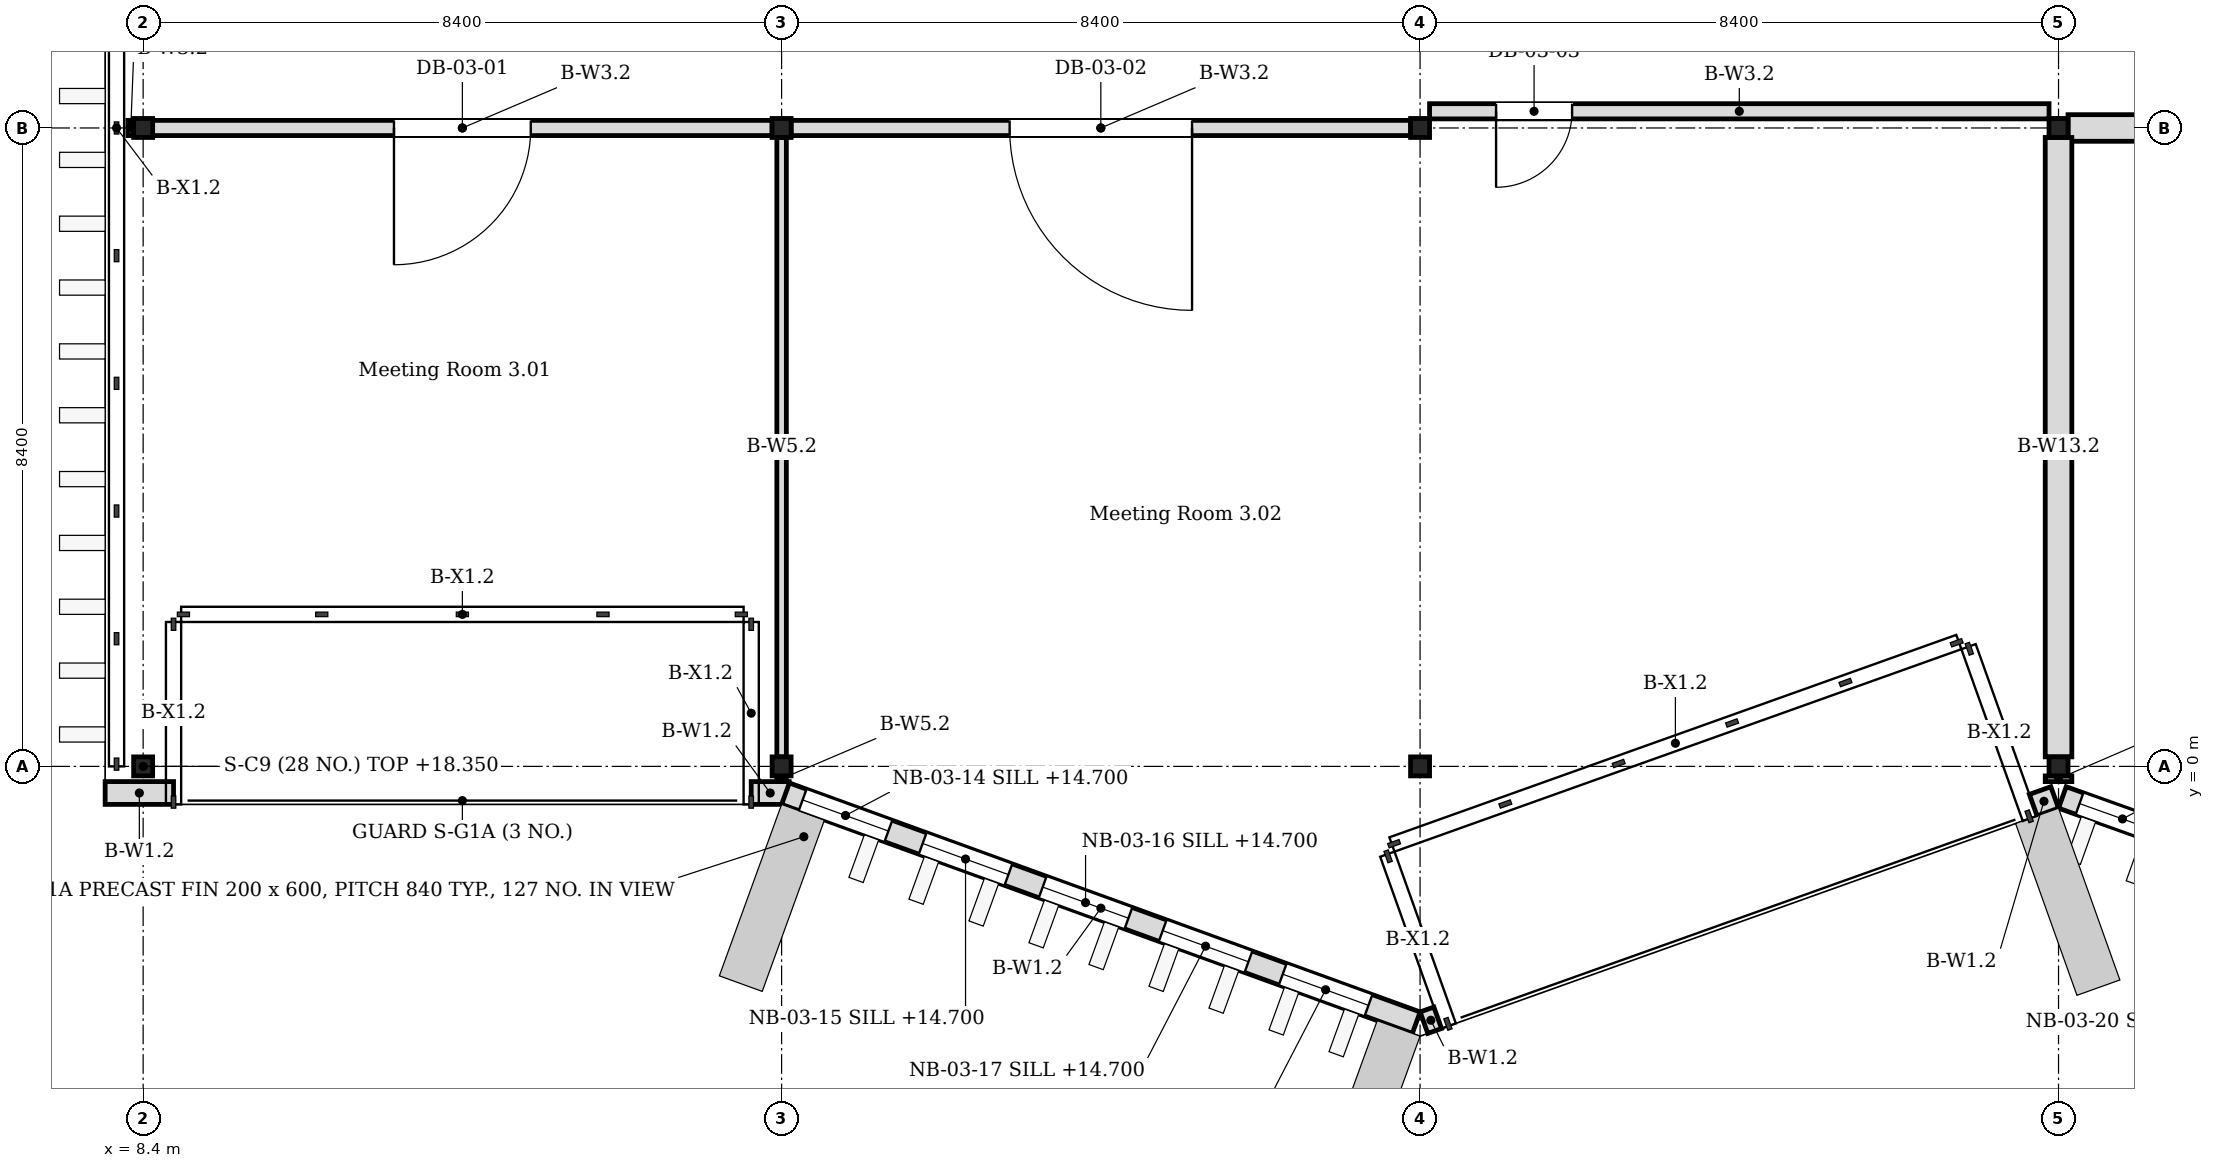
"""IFC4 building model, lengths in metres.
Left out: names, types, materials, properties, quantities, classifications, styles, units other than length and angle.
Written with IfcOpenShell. Run it as: python <this file> out.ifc"""

import sys

from ifc_helpers import new_model, si_unit, direction, frame, frame_2d, origin, origin_2d, place, context, subcontext, project, spatial, rectangle, i_section, extrude, element, fill, save


model = new_model("IFC4")
c1 = context("Model", 3, precision=1e-05, world=origin(), true_north=direction((0.0, 1.0)))
c2 = subcontext(c1, "Body", "Model", "MODEL_VIEW")
j1 = project(units=[si_unit("LENGTHUNIT", "METRE"), si_unit("PLANEANGLEUNIT", "RADIAN")], contexts=[c1])
p1 = place(None, origin())
s1 = spatial("IfcSite", under=j1, at=p1, CompositionType="ELEMENT")
p2 = place(p1, origin())
s2 = spatial("IfcBuilding", under=s1, at=p2, CompositionType="ELEMENT")
p3 = place(p2, frame((0.0, 0.0, 14.4)))
s3 = spatial("IfcBuildingStorey", under=s2, at=p3, CompositionType="ELEMENT", Elevation=14.4)
for number, where, z_axis, x_axis in (
    (1, (8.4, 0.0, 0.0), (0.0, 0.0, 1.0), (1.0, 0.0, 0.0)),
    (2, (8.4, 8.4, 0.0), (0.0, 0.0, 1.0), (1.0, 0.0, 0.0)),
    (3, (16.8, 0.0, 0.0), (0.0, 0.0, 1.0), (1.0, 0.0, 0.0)),
    (4, (16.8, 8.4, 0.0), (0.0, 0.0, 1.0), (1.0, 0.0, 0.0)),
    (5, (25.2, 0.0, 0.0), (0.0, 0.0, 1.0), (1.0, 0.0, 0.0)),
    (6, (25.2, 8.4, 0.0), (0.0, 0.0, 1.0), (1.0, 0.0, 0.0)),
    (7, (33.6, 0.0, 0.0), (0.0, 0.0, 1.0), (1.0, 0.0, 0.0)),
    (8, (33.6, 8.4, 0.0), (0.0, 0.0, 1.0), (1.0, 0.0, 0.0)),
):
    element("IfcColumn", number, at=place(p3, frame(where, z_axis=z_axis, x_axis=x_axis)), inside=s3, PredefinedType="COLUMN", context=c2, shape_type="SweptSolid", body=[
        extrude(i_section(OverallWidth=0.25, OverallDepth=0.25, WebThickness=0.009, FlangeThickness=0.014, FilletRadius=0.013, at=origin_2d()), origin(), (0.0, 0.0, 1.0), 3.95),
    ])
p4 = place(p3, frame((7.9, -0.35, 0.0), z_axis=(0.0, 0.0, 1.0), x_axis=(1.0, 0.0, 0.0)))
e9 = element("IfcWall", 9, at=p4, inside=s3, PredefinedType="SOLIDWALL", context=c2, shape_type="SweptSolid", body=[
    extrude(rectangle(XDim=0.9, YDim=0.3, at=frame_2d((0.45, 0.0))), origin(), (0.0, 0.0, 1.0), 3.95),
])
p5 = place(p3, frame((16.4, -0.35, 0.0), z_axis=(0.0, 0.0, 1.0), x_axis=(1.0, 0.0, 0.0)))
e10 = element("IfcWall", 10, at=p5, inside=s3, PredefinedType="SOLIDWALL", context=c2, shape_type="SweptSolid", body=[
    extrude(rectangle(XDim=0.5, YDim=0.3, at=frame_2d((0.25, 0.0))), origin(), (0.0, 0.0, 1.0), 3.95),
])
p6 = place(p3, frame((16.851, -0.359, 0.0), z_axis=(0.0, 0.0, 1.0), x_axis=(0.939953187971, -0.341303390584, 0.0)))
e11 = element("IfcWall", 11, at=p6, inside=s3, PredefinedType="SOLIDWALL", context=c2, shape_type="SweptSolid", body=[
    extrude(rectangle(XDim=8.828, YDim=0.3, at=frame_2d((4.414, 0.0))), origin(), (0.0, 0.0, 1.0), 3.95),
])
p7 = place(p6, frame((0.24, 0.0, 0.3)))
e12 = element("IfcOpeningElement", 12, at=p7, cuts=e11, PredefinedType="OPENING", context=c2, shape_type="SweptSolid", body=[
    extrude(rectangle(XDim=1.2, YDim=3.3, at=frame_2d((0.6, 1.65))), frame((0.0, 0.16, 0.0), z_axis=(0.0, -1.0, 0.0), x_axis=(1.0, 0.0, 0.0)), (0.0, 0.0, 1.0), 0.32),
])
p8 = place(p6, frame((1.92, 0.0, 0.3)))
e13 = element("IfcOpeningElement", 13, at=p8, cuts=e11, PredefinedType="OPENING", context=c2, shape_type="SweptSolid", body=[
    extrude(rectangle(XDim=1.2, YDim=3.3, at=frame_2d((0.6, 1.65))), frame((0.0, 0.16, 0.0), z_axis=(0.0, -1.0, 0.0), x_axis=(1.0, 0.0, 0.0)), (0.0, 0.0, 1.0), 0.32),
])
p9 = place(p6, frame((3.6, 0.0, 0.3)))
e14 = element("IfcOpeningElement", 14, at=p9, cuts=e11, PredefinedType="OPENING", context=c2, shape_type="SweptSolid", body=[
    extrude(rectangle(XDim=1.2, YDim=3.3, at=frame_2d((0.6, 1.65))), frame((0.0, 0.16, 0.0), z_axis=(0.0, -1.0, 0.0), x_axis=(1.0, 0.0, 0.0)), (0.0, 0.0, 1.0), 0.32),
])
p10 = place(p6, frame((5.28, 0.0, 0.3)))
e15 = element("IfcOpeningElement", 15, at=p10, cuts=e11, PredefinedType="OPENING", context=c2, shape_type="SweptSolid", body=[
    extrude(rectangle(XDim=1.2, YDim=3.3, at=frame_2d((0.6, 1.65))), frame((0.0, 0.16, 0.0), z_axis=(0.0, -1.0, 0.0), x_axis=(1.0, 0.0, 0.0)), (0.0, 0.0, 1.0), 0.32),
])
p11 = place(p6, frame((6.96, 0.0, 0.3)))
e16 = element("IfcOpeningElement", 16, at=p11, cuts=e11, PredefinedType="OPENING", context=c2, shape_type="SweptSolid", body=[
    extrude(rectangle(XDim=1.2, YDim=3.3, at=frame_2d((0.6, 1.65))), frame((0.0, 0.16, 0.0), z_axis=(0.0, -1.0, 0.0), x_axis=(1.0, 0.0, 0.0)), (0.0, 0.0, 1.0), 0.32),
])
p12 = place(p3, frame((25.251, -3.372, 0.0), z_axis=(0.0, 0.0, 1.0), x_axis=(0.942000485661, 0.335611509061, 0.0)))
e17 = element("IfcWall", 17, at=p12, inside=s3, PredefinedType="SOLIDWALL", context=c2, shape_type="SweptSolid", body=[
    extrude(rectangle(XDim=0.192, YDim=0.3, at=frame_2d((0.096, 0.0))), origin(), (0.0, 0.0, 1.0), 3.95),
])
p13 = place(p3, frame((33.267, -0.51, 0.0), z_axis=(0.0, 0.0, 1.0), x_axis=(0.941797147708, 0.336181695768, 0.0)))
e18 = element("IfcWall", 18, at=p13, inside=s3, PredefinedType="SOLIDWALL", context=c2, shape_type="SweptSolid", body=[
    extrude(rectangle(XDim=0.3, YDim=0.3, at=frame_2d((0.15, 0.0))), origin(), (0.0, 0.0, 1.0), 3.95),
])
p14 = place(p3, frame((33.65, -0.409, 0.0), z_axis=(0.0, 0.0, 1.0), x_axis=(0.941736270411, -0.336352191894, 0.0)))
e19 = element("IfcWall", 19, at=p14, inside=s3, PredefinedType="SOLIDWALL", context=c2, shape_type="SweptSolid", body=[
    extrude(rectangle(XDim=8.812, YDim=0.3, at=frame_2d((4.406, 0.0))), origin(), (0.0, 0.0, 1.0), 3.95),
])
p15 = place(p14, frame((0.24, 0.0, 0.3)))
e20 = element("IfcOpeningElement", 20, at=p15, cuts=e19, PredefinedType="OPENING", context=c2, shape_type="SweptSolid", body=[
    extrude(rectangle(XDim=1.2, YDim=3.3, at=frame_2d((0.6, 1.65))), frame((0.0, 0.16, 0.0), z_axis=(0.0, -1.0, 0.0), x_axis=(1.0, 0.0, 0.0)), (0.0, 0.0, 1.0), 0.32),
])
p16 = place(p14, frame((1.92, 0.0, 0.3)))
e21 = element("IfcOpeningElement", 21, at=p16, cuts=e19, PredefinedType="OPENING", context=c2, shape_type="SweptSolid", body=[
    extrude(rectangle(XDim=1.2, YDim=3.3, at=frame_2d((0.6, 1.65))), frame((0.0, 0.16, 0.0), z_axis=(0.0, -1.0, 0.0), x_axis=(1.0, 0.0, 0.0)), (0.0, 0.0, 1.0), 0.32),
])
p17 = place(p14, frame((3.6, 0.0, 0.3)))
e22 = element("IfcOpeningElement", 22, at=p17, cuts=e19, PredefinedType="OPENING", context=c2, shape_type="SweptSolid", body=[
    extrude(rectangle(XDim=1.2, YDim=3.3, at=frame_2d((0.6, 1.65))), frame((0.0, 0.16, 0.0), z_axis=(0.0, -1.0, 0.0), x_axis=(1.0, 0.0, 0.0)), (0.0, 0.0, 1.0), 0.32),
])
p18 = place(p14, frame((5.28, 0.0, 0.3)))
e23 = element("IfcOpeningElement", 23, at=p18, cuts=e19, PredefinedType="OPENING", context=c2, shape_type="SweptSolid", body=[
    extrude(rectangle(XDim=1.2, YDim=3.3, at=frame_2d((0.6, 1.65))), frame((0.0, 0.16, 0.0), z_axis=(0.0, -1.0, 0.0), x_axis=(1.0, 0.0, 0.0)), (0.0, 0.0, 1.0), 0.32),
])
p19 = place(p14, frame((6.96, 0.0, 0.3)))
e24 = element("IfcOpeningElement", 24, at=p19, cuts=e19, PredefinedType="OPENING", context=c2, shape_type="SweptSolid", body=[
    extrude(rectangle(XDim=1.2, YDim=3.3, at=frame_2d((0.6, 1.65))), frame((0.0, 0.16, 0.0), z_axis=(0.0, -1.0, 0.0), x_axis=(1.0, 0.0, 0.0)), (0.0, 0.0, 1.0), 0.32),
])
p20 = place(p3, frame((8.2, 8.4, 0.0), z_axis=(0.0, 0.0, 1.0), x_axis=(1.0, 0.0, 0.0)))
e25 = element("IfcWall", 25, at=p20, inside=s3, PredefinedType="PARTITIONING", context=c2, shape_type="SweptSolid", body=[
    extrude(rectangle(XDim=0.075, YDim=0.2, at=frame_2d((0.038, 0.0))), origin(), (0.0, 0.0, 1.0), 3.25),
])
p21 = place(p3, frame((8.525, 8.4, 0.0), z_axis=(0.0, 0.0, 1.0), x_axis=(1.0, 0.0, 0.0)))
e26 = element("IfcWall", 26, at=p21, inside=s3, PredefinedType="PARTITIONING", context=c2, shape_type="SweptSolid", body=[
    extrude(rectangle(XDim=8.15, YDim=0.2, at=frame_2d((4.075, 0.0))), origin(), (0.0, 0.0, 1.0), 3.25),
])
p22 = place(p21, frame((3.175, 0.0, 0.0)))
e27 = element("IfcOpeningElement", 27, at=p22, cuts=e26, PredefinedType="OPENING", context=c2, shape_type="SweptSolid", body=[
    extrude(rectangle(XDim=1.8, YDim=2.1, at=frame_2d((0.9, 1.05))), frame((0.0, 0.11, 0.0), z_axis=(0.0, -1.0, 0.0), x_axis=(1.0, 0.0, 0.0)), (0.0, 0.0, 1.0), 0.22),
])
p23 = place(p3, frame((16.925, 8.4, 0.0), z_axis=(0.0, 0.0, 1.0), x_axis=(1.0, 0.0, 0.0)))
e28 = element("IfcWall", 28, at=p23, inside=s3, PredefinedType="PARTITIONING", context=c2, shape_type="SweptSolid", body=[
    extrude(rectangle(XDim=8.15, YDim=0.2, at=frame_2d((4.075, 0.0))), origin(), (0.0, 0.0, 1.0), 3.25),
])
p24 = place(p23, frame((2.875, 0.0, 0.0)))
e29 = element("IfcOpeningElement", 29, at=p24, cuts=e28, PredefinedType="OPENING", context=c2, shape_type="SweptSolid", body=[
    extrude(rectangle(XDim=2.4, YDim=2.2, at=frame_2d((1.2, 1.1))), frame((0.0, 0.11, 0.0), z_axis=(0.0, -1.0, 0.0), x_axis=(1.0, 0.0, 0.0)), (0.0, 0.0, 1.0), 0.22),
])
p25 = place(p3, frame((25.325, 8.619, 0.0), z_axis=(0.0, 0.0, 1.0), x_axis=(1.0, 0.0, 0.0)))
e30 = element("IfcWall", 30, at=p25, inside=s3, PredefinedType="PARTITIONING", context=c2, shape_type="SweptSolid", body=[
    extrude(rectangle(XDim=8.15, YDim=0.2, at=frame_2d((4.075, 0.0))), origin(), (0.0, 0.0, 1.0), 3.25),
])
p26 = place(p25, frame((0.875, 0.0, 0.0)))
e31 = element("IfcOpeningElement", 31, at=p26, cuts=e30, PredefinedType="OPENING", context=c2, shape_type="SweptSolid", body=[
    extrude(rectangle(XDim=1.0, YDim=2.1, at=frame_2d((0.5, 1.05))), frame((0.0, 0.11, 0.0), z_axis=(0.0, -1.0, 0.0), x_axis=(1.0, 0.0, 0.0)), (0.0, 0.0, 1.0), 0.22),
])
p27 = place(p3, frame((33.725, 8.4, 0.0), z_axis=(0.0, 0.0, 1.0), x_axis=(1.0, 0.0, 0.0)))
e32 = element("IfcWall", 32, at=p27, inside=s3, PredefinedType="PARTITIONING", context=c2, shape_type="SweptSolid", body=[
    extrude(rectangle(XDim=8.15, YDim=0.35, at=frame_2d((4.075, 0.0))), origin(), (0.0, 0.0, 1.0), 3.25),
])
p28 = place(p27, frame((3.525, 0.0, 0.0)))
e33 = element("IfcOpeningElement", 33, at=p28, cuts=e32, PredefinedType="OPENING", context=c2, shape_type="SweptSolid", body=[
    extrude(rectangle(XDim=1.1, YDim=2.4, at=frame_2d((0.55, 1.2))), frame((0.0, 0.185, 0.0), z_axis=(0.0, -1.0, 0.0), x_axis=(1.0, 0.0, 0.0)), (0.0, 0.0, 1.0), 0.37),
])
p29 = place(p3, frame((16.8, -0.2, 0.0), z_axis=(0.0, 0.0, 1.0), x_axis=(0.0, 1.0, 0.0)))
e34 = element("IfcWall", 34, at=p29, inside=s3, PredefinedType="MOVABLE", context=c2, shape_type="SweptSolid", body=[
    extrude(rectangle(XDim=0.075, YDim=0.125, at=frame_2d((0.038, 0.0))), origin(), (0.0, 0.0, 1.0), 3.25),
])
p30 = place(p3, frame((16.8, 0.125, 0.0), z_axis=(0.0, 0.0, 1.0), x_axis=(0.0, 1.0, 0.0)))
e35 = element("IfcWall", 35, at=p30, inside=s3, PredefinedType="MOVABLE", context=c2, shape_type="SweptSolid", body=[
    extrude(rectangle(XDim=8.15, YDim=0.125, at=frame_2d((4.075, 0.0))), origin(), (0.0, 0.0, 1.0), 3.25),
])
p31 = place(p3, frame((33.6, -0.2, 0.0), z_axis=(0.0, 0.0, 1.0), x_axis=(0.0, 1.0, 0.0)))
e36 = element("IfcWall", 36, at=p31, inside=s3, PredefinedType="PARTITIONING", context=c2, shape_type="SweptSolid", body=[
    extrude(rectangle(XDim=0.075, YDim=0.35, at=frame_2d((0.038, 0.0))), origin(), (0.0, 0.0, 1.0), 3.25),
])
p32 = place(p3, frame((33.6, 0.125, 0.0), z_axis=(0.0, 0.0, 1.0), x_axis=(0.0, 1.0, 0.0)))
e37 = element("IfcWall", 37, at=p32, inside=s3, PredefinedType="PARTITIONING", context=c2, shape_type="SweptSolid", body=[
    extrude(rectangle(XDim=8.15, YDim=0.35, at=frame_2d((4.075, 0.0))), origin(), (0.0, 0.0, 1.0), 3.25),
])
p33 = place(p7, origin())
e38 = element("IfcWindow", 38, at=p33, inside=s3, PartitioningType="TRIPLE_PANEL_VERTICAL", PredefinedType="WINDOW", context=c2, shape_type="SweptSolid", body=[
    extrude(rectangle(XDim=1.2, YDim=3.3, at=frame_2d((0.6, 1.65))), frame((0.0, 0.03, 0.0), z_axis=(0.0, -1.0, 0.0), x_axis=(1.0, 0.0, 0.0)), (0.0, 0.0, 1.0), 0.06),
])
fill(e12, e38)
p34 = place(p8, origin())
e39 = element("IfcWindow", 39, at=p34, inside=s3, PartitioningType="TRIPLE_PANEL_VERTICAL", PredefinedType="WINDOW", context=c2, shape_type="SweptSolid", body=[
    extrude(rectangle(XDim=1.2, YDim=3.3, at=frame_2d((0.6, 1.65))), frame((0.0, 0.03, 0.0), z_axis=(0.0, -1.0, 0.0), x_axis=(1.0, 0.0, 0.0)), (0.0, 0.0, 1.0), 0.06),
])
fill(e13, e39)
p35 = place(p9, origin())
e40 = element("IfcWindow", 40, at=p35, inside=s3, PartitioningType="TRIPLE_PANEL_VERTICAL", PredefinedType="WINDOW", context=c2, shape_type="SweptSolid", body=[
    extrude(rectangle(XDim=1.2, YDim=3.3, at=frame_2d((0.6, 1.65))), frame((0.0, 0.03, 0.0), z_axis=(0.0, -1.0, 0.0), x_axis=(1.0, 0.0, 0.0)), (0.0, 0.0, 1.0), 0.06),
])
fill(e14, e40)
p36 = place(p10, origin())
e41 = element("IfcWindow", 41, at=p36, inside=s3, PartitioningType="TRIPLE_PANEL_VERTICAL", PredefinedType="WINDOW", context=c2, shape_type="SweptSolid", body=[
    extrude(rectangle(XDim=1.2, YDim=3.3, at=frame_2d((0.6, 1.65))), frame((0.0, 0.03, 0.0), z_axis=(0.0, -1.0, 0.0), x_axis=(1.0, 0.0, 0.0)), (0.0, 0.0, 1.0), 0.06),
])
fill(e15, e41)
p37 = place(p11, origin())
e42 = element("IfcWindow", 42, at=p37, inside=s3, PartitioningType="TRIPLE_PANEL_VERTICAL", PredefinedType="WINDOW", context=c2, shape_type="SweptSolid", body=[
    extrude(rectangle(XDim=1.2, YDim=3.3, at=frame_2d((0.6, 1.65))), frame((0.0, 0.03, 0.0), z_axis=(0.0, -1.0, 0.0), x_axis=(1.0, 0.0, 0.0)), (0.0, 0.0, 1.0), 0.06),
])
fill(e16, e42)
p38 = place(p15, origin())
e43 = element("IfcWindow", 43, at=p38, inside=s3, PartitioningType="TRIPLE_PANEL_VERTICAL", PredefinedType="WINDOW", context=c2, shape_type="SweptSolid", body=[
    extrude(rectangle(XDim=1.2, YDim=3.3, at=frame_2d((0.6, 1.65))), frame((0.0, 0.03, 0.0), z_axis=(0.0, -1.0, 0.0), x_axis=(1.0, 0.0, 0.0)), (0.0, 0.0, 1.0), 0.06),
])
fill(e20, e43)
p39 = place(p22, origin())
e44 = element("IfcDoor", 44, at=p39, inside=s3, OperationType="DOUBLE_DOOR_SINGLE_SWING", PredefinedType="DOOR", context=c2, shape_type="SweptSolid", body=[
    extrude(rectangle(XDim=1.8, YDim=2.1, at=frame_2d((0.9, 1.05))), frame((0.0, 0.025, 0.0), z_axis=(0.0, -1.0, 0.0), x_axis=(1.0, 0.0, 0.0)), (0.0, 0.0, 1.0), 0.05),
])
fill(e27, e44)
p40 = place(p24, origin())
e45 = element("IfcDoor", 45, at=p40, inside=s3, OperationType="DOUBLE_DOOR_SINGLE_SWING", PredefinedType="DOOR", context=c2, shape_type="SweptSolid", body=[
    extrude(rectangle(XDim=2.4, YDim=2.2, at=frame_2d((1.2, 1.1))), frame((0.0, 0.025, 0.0), z_axis=(0.0, -1.0, 0.0), x_axis=(1.0, 0.0, 0.0)), (0.0, 0.0, 1.0), 0.05),
])
fill(e29, e45)
p41 = place(p26, origin())
e46 = element("IfcDoor", 46, at=p41, inside=s3, OperationType="SINGLE_SWING_LEFT", PredefinedType="DOOR", context=c2, shape_type="SweptSolid", body=[
    extrude(rectangle(XDim=1.0, YDim=2.1, at=frame_2d((0.5, 1.05))), frame((0.0, 0.025, 0.0), z_axis=(0.0, -1.0, 0.0), x_axis=(1.0, 0.0, 0.0)), (0.0, 0.0, 1.0), 0.05),
])
fill(e31, e46)
save(model, sys.argv[1])
